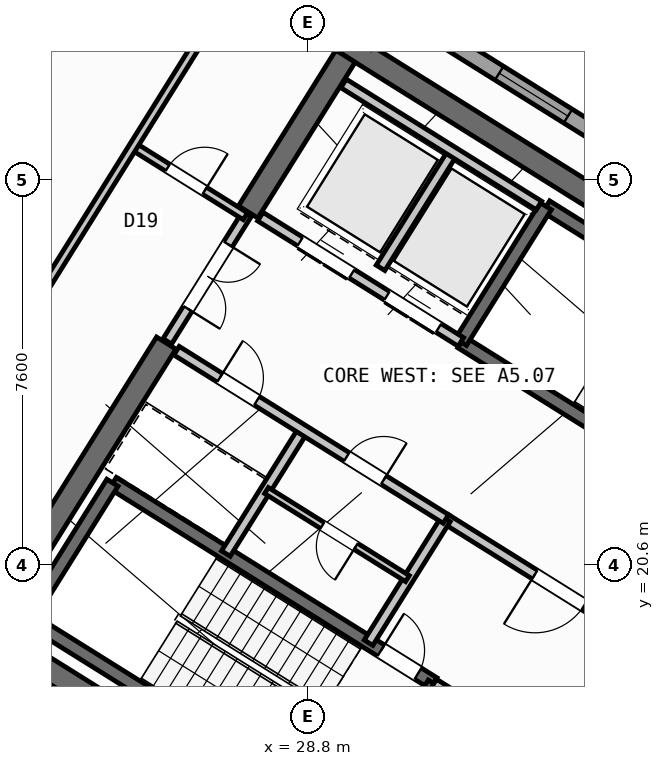
"""IFC4 building model, lengths in metres.
Left out: names, types, materials, properties, quantities, classifications, styles, units other than length and angle.
Written with IfcOpenShell. Run it as: python <this file> out.ifc"""

import sys

from ifc_helpers import new_model, si_unit, direction, frame, frame_2d, origin, place, context, subcontext, project, spatial, rectangle, extrude, source, transform, mapped, element, fill, save


model = new_model("IFC4")
c1 = context("Model", 3, precision=1e-05, world=origin(), true_north=direction((0.0, 1.0)))
c2 = subcontext(c1, "Body", "Model", "MODEL_VIEW")
j1 = project(units=[si_unit("LENGTHUNIT", "METRE"), si_unit("PLANEANGLEUNIT", "RADIAN")], contexts=[c1])
p1 = place(None, origin())
s1 = spatial("IfcSite", under=j1, at=p1, CompositionType="ELEMENT")
p2 = place(p1, origin())
s2 = spatial("IfcBuilding", under=s1, at=p2, CompositionType="ELEMENT")
p3 = place(p2, frame((0.0, 0.0, 254.7)))
s3 = spatial("IfcBuildingStorey", under=s2, at=p3, CompositionType="ELEMENT", Elevation=254.7)
p4 = place(p3, frame((40.531, 24.036, 0.0), z_axis=(0.0, 0.0, 1.0), x_axis=(-0.848048787466, 0.529918157905, 0.0)))
e1 = element("IfcWall", 1, at=p4, inside=s3, PredefinedType="SHEAR", context=c2, shape_type="SweptSolid", body=[
    extrude(rectangle(XDim=13.04, YDim=0.45, at=frame_2d((6.52, 0.0))), origin(), (0.0, 0.0, 1.0), 4.25),
])
p5 = place(p3, frame((33.324, 12.503, 0.0), z_axis=(0.0, 0.0, 1.0), x_axis=(-0.848043529849, 0.529926571782, 0.0)))
e2 = element("IfcWall", 2, at=p5, inside=s3, PredefinedType="SHEAR", context=c2, shape_type="SweptSolid", body=[
    extrude(rectangle(XDim=13.04, YDim=0.45, at=frame_2d((6.52, 0.0))), origin(), (0.0, 0.0, 1.0), 4.25),
])
p6 = place(p3, frame((36.683, 18.304, 0.0), z_axis=(0.0, 0.0, 1.0), x_axis=(-0.529904039071, -0.848057609704, 0.0)))
e3 = element("IfcWall", 3, at=p6, inside=s3, PredefinedType="SHEAR", context=c2, shape_type="SweptSolid", body=[
    extrude(rectangle(XDim=6.475, YDim=0.45, at=frame_2d((3.238, 0.0))), origin(), (0.0, 0.0, 1.0), 4.25),
])
p7 = place(p3, frame((29.544, 30.636, 0.0), z_axis=(0.0, 0.0, 1.0), x_axis=(-0.529902075036, -0.848058836916, 0.0)))
e4 = element("IfcWall", 4, at=p7, inside=s3, PredefinedType="SHEAR", context=c2, shape_type="SweptSolid", body=[
    extrude(rectangle(XDim=3.625, YDim=0.45, at=frame_2d((1.812, 0.0))), origin(), (0.0, 0.0, 1.0), 4.25),
])
p8 = place(p3, frame((26.007, 24.976, 0.0), z_axis=(0.0, 0.0, 1.0), x_axis=(-0.529931155655, -0.848040665456, 0.0)))
e5 = element("IfcWall", 5, at=p8, inside=s3, PredefinedType="SHEAR", context=c2, shape_type="SweptSolid", body=[
    extrude(rectangle(XDim=6.475, YDim=0.45, at=frame_2d((3.238, 0.0))), origin(), (0.0, 0.0, 1.0), 4.25),
])
p9 = place(p3, frame((29.268, 6.429, 0.0), z_axis=(0.0, 0.0, 1.0), x_axis=(-0.848049971435, 0.529916263149, 0.0)))
e6 = element("IfcWall", 6, at=p9, inside=s3, PredefinedType="STANDARD", context=c2, shape_type="SweptSolid", body=[
    extrude(rectangle(XDim=31.588, YDim=0.32, at=frame_2d((15.794, 0.0))), origin(), (0.0, 0.0, 1.0), 4.25),
])
p10 = place(p9, frame((22.349, 0.0, 0.0)))
e7 = element("IfcOpeningElement", 7, at=p10, cuts=e6, PredefinedType="OPENING", context=c2, shape_type="SweptSolid", body=[
    extrude(rectangle(XDim=1.2, YDim=2.15, at=frame_2d((0.6, 1.075))), frame((0.0, 0.17, 0.0), z_axis=(0.0, -1.0, 0.0), x_axis=(1.0, 0.0, 0.0)), (0.0, 0.0, 1.0), 0.34),
])
p11 = place(p9, frame((11.489, 0.0, 0.7)))
e8 = element("IfcOpeningElement", 8, at=p11, cuts=e6, PredefinedType="OPENING", context=c2, shape_type="SweptSolid", body=[
    extrude(rectangle(XDim=2.6, YDim=2.0, at=frame_2d((1.3, 1.0))), frame((0.0, 0.17, 0.0), z_axis=(0.0, -1.0, 0.0), x_axis=(1.0, 0.0, 0.0)), (0.0, 0.0, 1.0), 0.34),
])
p12 = place(p9, frame((17.881, 0.0, 0.75)))
e9 = element("IfcOpeningElement", 9, at=p12, cuts=e6, PredefinedType="OPENING", context=c2, shape_type="SweptSolid", body=[
    extrude(rectangle(XDim=2.0, YDim=1.95, at=frame_2d((1.0, 0.975))), frame((0.0, 0.17, 0.0), z_axis=(0.0, -1.0, 0.0), x_axis=(1.0, 0.0, 0.0)), (0.0, 0.0, 1.0), 0.34),
])
p13 = place(p9, frame((25.501, 0.0, 0.85)))
e10 = element("IfcOpeningElement", 10, at=p13, cuts=e6, PredefinedType="OPENING", context=c2, shape_type="SweptSolid", body=[
    extrude(rectangle(XDim=1.6, YDim=1.8, at=frame_2d((0.8, 0.9))), frame((0.0, 0.17, 0.0), z_axis=(0.0, -1.0, 0.0), x_axis=(1.0, 0.0, 0.0)), (0.0, 0.0, 1.0), 0.34),
])
p14 = place(p9, frame((28.725, 0.0, 0.85)))
e11 = element("IfcOpeningElement", 11, at=p14, cuts=e6, PredefinedType="OPENING", context=c2, shape_type="SweptSolid", body=[
    extrude(rectangle(XDim=1.6, YDim=1.8, at=frame_2d((0.8, 0.9))), frame((0.0, 0.17, 0.0), z_axis=(0.0, -1.0, 0.0), x_axis=(1.0, 0.0, 0.0)), (0.0, 0.0, 1.0), 0.34),
])
p15 = place(p3, frame((14.138, 41.825, 0.0), z_axis=(0.0, 0.0, 1.0), x_axis=(0.848046498049, -0.529921821731, 0.0)))
e12 = element("IfcWall", 12, at=p15, inside=s3, PredefinedType="STANDARD", context=c2, shape_type="SweptSolid", body=[
    extrude(rectangle(XDim=31.588, YDim=0.32, at=frame_2d((15.794, 0.0))), origin(), (0.0, 0.0, 1.0), 4.25),
])
p16 = place(p15, frame((9.946, 0.0, 0.0)))
e13 = element("IfcOpeningElement", 13, at=p16, cuts=e12, PredefinedType="OPENING", context=c2, shape_type="SweptSolid", body=[
    extrude(rectangle(XDim=1.05, YDim=2.15, at=frame_2d((0.525, 1.075))), frame((0.0, 0.17, 0.0), z_axis=(0.0, -1.0, 0.0), x_axis=(1.0, 0.0, 0.0)), (0.0, 0.0, 1.0), 0.34),
])
p17 = place(p15, frame((0.763, 0.0, 0.75)))
e14 = element("IfcOpeningElement", 14, at=p17, cuts=e12, PredefinedType="OPENING", context=c2, shape_type="SweptSolid", body=[
    extrude(rectangle(XDim=2.0, YDim=1.95, at=frame_2d((1.0, 0.975))), frame((0.0, 0.17, 0.0), z_axis=(0.0, -1.0, 0.0), x_axis=(1.0, 0.0, 0.0)), (0.0, 0.0, 1.0), 0.34),
])
p18 = place(p15, frame((13.574, 0.0, 0.75)))
e15 = element("IfcOpeningElement", 15, at=p18, cuts=e12, PredefinedType="OPENING", context=c2, shape_type="SweptSolid", body=[
    extrude(rectangle(XDim=2.0, YDim=1.95, at=frame_2d((1.0, 0.975))), frame((0.0, 0.17, 0.0), z_axis=(0.0, -1.0, 0.0), x_axis=(1.0, 0.0, 0.0)), (0.0, 0.0, 1.0), 0.34),
])
p19 = place(p15, frame((21.744, 0.0, 0.85)))
e16 = element("IfcOpeningElement", 16, at=p19, cuts=e12, PredefinedType="OPENING", context=c2, shape_type="SweptSolid", body=[
    extrude(rectangle(XDim=1.6, YDim=1.8, at=frame_2d((0.8, 0.9))), frame((0.0, 0.17, 0.0), z_axis=(0.0, -1.0, 0.0), x_axis=(1.0, 0.0, 0.0)), (0.0, 0.0, 1.0), 0.34),
])
p20 = place(p15, frame((27.444, 0.0, 0.85)))
e17 = element("IfcOpeningElement", 17, at=p20, cuts=e12, PredefinedType="OPENING", context=c2, shape_type="SweptSolid", body=[
    extrude(rectangle(XDim=1.6, YDim=1.8, at=frame_2d((0.8, 0.9))), frame((0.0, 0.17, 0.0), z_axis=(0.0, -1.0, 0.0), x_axis=(1.0, 0.0, 0.0)), (0.0, 0.0, 1.0), 0.34),
])
p21 = place(p3, frame((29.605, 15.581, 0.0), z_axis=(0.0, 0.0, 1.0), x_axis=(-0.848036911448, 0.529937163087, 0.0)))
e18 = element("IfcWall", 18, at=p21, inside=s3, PredefinedType="SHEAR", context=c2, shape_type="SweptSolid", body=[
    extrude(rectangle(XDim=7.46, YDim=0.26, at=frame_2d((3.73, 0.0))), origin(), (0.0, 0.0, 1.0), 4.25),
])
p22 = place(p3, frame((31.28, 18.261, 0.0), z_axis=(0.0, 0.0, 1.0), x_axis=(-0.848051618787, 0.529913626805, 0.0)))
e19 = element("IfcWall", 19, at=p22, inside=s3, PredefinedType="SHEAR", context=c2, shape_type="SweptSolid", body=[
    extrude(rectangle(XDim=7.46, YDim=0.26, at=frame_2d((3.73, 0.0))), origin(), (0.0, 0.0, 1.0), 4.25),
])
p23 = place(p22, frame((0.36, 0.0, 0.0)))
e20 = element("IfcOpeningElement", 20, at=p23, cuts=e19, PredefinedType="OPENING", context=c2, shape_type="SweptSolid", body=[
    extrude(rectangle(XDim=0.86, YDim=2.05, at=frame_2d((0.43, 1.025))), frame((0.0, 0.14, 0.0), z_axis=(0.0, -1.0, 0.0), x_axis=(1.0, 0.0, 0.0)), (0.0, 0.0, 1.0), 0.28),
])
p24 = place(p3, frame((31.288, 18.256, 0.0), z_axis=(0.0, 0.0, 1.0), x_axis=(-0.529943379326, -0.848033026897, 0.0)))
e21 = element("IfcWall", 21, at=p24, inside=s3, PredefinedType="SHEAR", context=c2, shape_type="SweptSolid", body=[
    extrude(rectangle(XDim=3.16, YDim=0.26, at=frame_2d((1.58, 0.0))), origin(), (0.0, 0.0, 1.0), 4.25),
])
p25 = place(p3, frame((24.945, 22.22, 0.0), z_axis=(0.0, 0.0, 1.0), x_axis=(-0.529908658664, -0.84805472316, 0.0)))
e22 = element("IfcWall", 22, at=p25, inside=s3, PredefinedType="SHEAR", context=c2, shape_type="SweptSolid", body=[
    extrude(rectangle(XDim=3.16, YDim=0.26, at=frame_2d((1.58, 0.0))), origin(), (0.0, 0.0, 1.0), 4.25),
])
p26 = place(p3, frame((39.721, 23.788, 0.0), z_axis=(0.0, 0.0, 1.0), x_axis=(-0.848054434086, 0.529909121291, 0.0)))
e23 = element("IfcWall", 23, at=p26, inside=s3, PredefinedType="SHEAR", context=c2, shape_type="SweptSolid", body=[
    extrude(rectangle(XDim=7.33, YDim=0.26, at=frame_2d((3.665, 0.0))), origin(), (0.0, 0.0, 1.0), 4.25),
])
p27 = place(p3, frame((38.046, 21.108, 0.0), z_axis=(0.0, 0.0, 1.0), x_axis=(-0.848054434086, 0.529909121291, 0.0)))
e24 = element("IfcWall", 24, at=p27, inside=s3, PredefinedType="SHEAR", context=c2, shape_type="SweptSolid", body=[
    extrude(rectangle(XDim=7.33, YDim=0.26, at=frame_2d((3.665, 0.0))), origin(), (0.0, 0.0, 1.0), 4.25),
])
p28 = place(p27, frame((0.22, 0.0, 0.0)))
e25 = element("IfcOpeningElement", 25, at=p28, cuts=e24, PredefinedType="OPENING", context=c2, shape_type="SweptSolid", body=[
    extrude(rectangle(XDim=1.1, YDim=2.1, at=frame_2d((0.55, 1.05))), frame((0.0, 0.14, 0.0), z_axis=(0.0, -1.0, 0.0), x_axis=(1.0, 0.0, 0.0)), (0.0, 0.0, 1.0), 0.28),
])
p29 = place(p3, frame((33.496, 27.677, 0.0), z_axis=(0.0, 0.0, 1.0), x_axis=(-0.529908658664, -0.84805472316, 0.0)))
e26 = element("IfcWall", 26, at=p29, inside=s3, PredefinedType="SHEAR", context=c2, shape_type="SweptSolid", body=[
    extrude(rectangle(XDim=3.16, YDim=0.26, at=frame_2d((1.58, 0.0))), origin(), (0.0, 0.0, 1.0), 4.25),
])
p30 = place(p3, frame((34.933, 15.978, 0.0), z_axis=(0.0, 0.0, 1.0), x_axis=(-0.848055739377, 0.529907032327, 0.0)))
e27 = element("IfcWall", 27, at=p30, inside=s3, PredefinedType="STANDARD", context=c2, shape_type="SweptSolid", body=[
    extrude(rectangle(XDim=4.298, YDim=0.2, at=frame_2d((2.149, 0.0))), origin(), (0.0, 0.0, 1.0), 4.24),
])
p31 = place(p30, frame((0.448, 0.0, 0.0)))
e28 = element("IfcOpeningElement", 28, at=p31, cuts=e27, PredefinedType="OPENING", context=c2, shape_type="SweptSolid", body=[
    extrude(rectangle(XDim=1.3, YDim=2.2, at=frame_2d((0.65, 1.1))), frame((0.0, 0.11, 0.0), z_axis=(0.0, -1.0, 0.0), x_axis=(1.0, 0.0, 0.0)), (0.0, 0.0, 1.0), 0.22),
])
p32 = place(p30, frame((2.523, 0.0, 0.0)))
e29 = element("IfcOpeningElement", 29, at=p32, cuts=e27, PredefinedType="OPENING", context=c2, shape_type="SweptSolid", body=[
    extrude(rectangle(XDim=1.45, YDim=2.25, at=frame_2d((0.725, 1.125))), frame((0.0, 0.11, 0.0), z_axis=(0.0, -1.0, 0.0), x_axis=(1.0, 0.0, 0.0)), (0.0, 0.0, 1.0), 0.22),
])
p33 = place(p3, frame((36.459, 18.421, 0.0), z_axis=(0.0, 0.0, 1.0), x_axis=(-0.848059591691, 0.529900867089, 0.0)))
e30 = element("IfcWall", 30, at=p33, inside=s3, PredefinedType="STANDARD", context=c2, shape_type="SweptSolid", body=[
    extrude(rectangle(XDim=5.818, YDim=0.2, at=frame_2d((2.909, 0.0))), origin(), (0.0, 0.0, 1.0), 4.24),
])
p34 = place(p33, frame((2.598, 0.0, 0.0)))
e31 = element("IfcOpeningElement", 31, at=p34, cuts=e30, PredefinedType="OPENING", context=c2, shape_type="SweptSolid", body=[
    extrude(rectangle(XDim=1.15, YDim=2.1, at=frame_2d((0.575, 1.05))), frame((0.0, 0.11, 0.0), z_axis=(0.0, -1.0, 0.0), x_axis=(1.0, 0.0, 0.0)), (0.0, 0.0, 1.0), 0.22),
])
p35 = place(p3, frame((31.822, 24.998, 0.0), z_axis=(0.0, 0.0, 1.0), x_axis=(-0.848054125777, 0.529909614701, 0.0)))
e32 = element("IfcWall", 32, at=p35, inside=s3, PredefinedType="STANDARD", context=c2, shape_type="SweptSolid", body=[
    extrude(rectangle(XDim=4.668, YDim=0.2, at=frame_2d((2.334, 0.0))), origin(), (0.0, 0.0, 1.0), 4.24),
])
p36 = place(p35, frame((0.52, 0.0, 0.0)))
e33 = element("IfcOpeningElement", 33, at=p36, cuts=e32, PredefinedType="OPENING", context=c2, shape_type="SweptSolid", body=[
    extrude(rectangle(XDim=1.2, YDim=2.15, at=frame_2d((0.6, 1.075))), frame((0.0, 0.11, 0.0), z_axis=(0.0, -1.0, 0.0), x_axis=(1.0, 0.0, 0.0)), (0.0, 0.0, 1.0), 0.22),
])
p37 = place(p35, frame((2.54, 0.0, 0.0)))
e34 = element("IfcOpeningElement", 34, at=p37, cuts=e32, PredefinedType="OPENING", context=c2, shape_type="SweptSolid", body=[
    extrude(rectangle(XDim=1.2, YDim=2.15, at=frame_2d((0.6, 1.075))), frame((0.0, 0.11, 0.0), z_axis=(0.0, -1.0, 0.0), x_axis=(1.0, 0.0, 0.0)), (0.0, 0.0, 1.0), 0.22),
])
p38 = place(p3, frame((31.645, 28.716, 0.0), z_axis=(0.0, 0.0, 1.0), x_axis=(-0.52986693015, -0.848080795876, 0.0)))
e35 = element("IfcWall", 35, at=p38, inside=s3, PredefinedType="STANDARD", context=c2, shape_type="SweptSolid", body=[
    extrude(rectangle(XDim=2.66, YDim=0.2, at=frame_2d((1.33, 0.0))), origin(), (0.0, 0.0, 1.0), 4.24),
])
p39 = place(p3, frame((33.363, 27.69, 0.0), z_axis=(0.0, 0.0, 1.0), x_axis=(-0.84804957148, 0.529916903215, 0.0)))
e36 = element("IfcWall", 36, at=p39, inside=s3, PredefinedType="STANDARD", context=c2, shape_type="SweptSolid", body=[
    extrude(rectangle(XDim=4.548, YDim=0.2, at=frame_2d((2.274, 0.0))), origin(), (0.0, 0.0, 1.0), 4.24),
])
for number, where, z_axis, x_axis in (
    (37, (31.525, 21.504, 0.0), (0.0, 0.0, 1.0), (-0.53, -0.848, 0.0)),
    (38, (28.71, 23.263, 0.0), (0.0, 0.0, 1.0), (-0.53, -0.848, 0.0)),
):
    element("IfcWall", number, at=place(p3, frame(where, z_axis=z_axis, x_axis=x_axis)), inside=s3, PredefinedType="STANDARD", context=c2, shape_type="SweptSolid", body=[
        extrude(rectangle(XDim=2.88, YDim=0.2, at=frame_2d((1.44, 0.0))), origin(), (0.0, 0.0, 1.0), 4.24),
    ])
p40 = place(p3, frame((31.525, 21.504, 0.0), z_axis=(0.0, 0.0, 1.0), x_axis=(-0.848042066329, 0.529928913853, 0.0)))
e39 = element("IfcWall", 39, at=p40, inside=s3, PredefinedType="STANDARD", context=c2, shape_type="SweptSolid", body=[
    extrude(rectangle(XDim=6.268, YDim=0.2, at=frame_2d((3.134, 0.0))), origin(), (0.0, 0.0, 1.0), 4.24),
])
p41 = place(p40, frame((4.4, 0.0, 0.0)))
e40 = element("IfcOpeningElement", 40, at=p41, cuts=e39, PredefinedType="OPENING", context=c2, shape_type="SweptSolid", body=[
    extrude(rectangle(XDim=0.86, YDim=2.05, at=frame_2d((0.43, 1.025))), frame((0.0, 0.11, 0.0), z_axis=(0.0, -1.0, 0.0), x_axis=(1.0, 0.0, 0.0)), (0.0, 0.0, 1.0), 0.22),
])
p42 = place(p40, frame((1.45, 0.0, 0.0)))
e41 = element("IfcOpeningElement", 41, at=p42, cuts=e39, PredefinedType="OPENING", context=c2, shape_type="SweptSolid", body=[
    extrude(rectangle(XDim=0.86, YDim=2.05, at=frame_2d((0.43, 1.025))), frame((0.0, 0.11, 0.0), z_axis=(0.0, -1.0, 0.0), x_axis=(1.0, 0.0, 0.0)), (0.0, 0.0, 1.0), 0.22),
])
p43 = place(p3, frame((30.766, 20.327, 0.0), z_axis=(0.0, 0.0, 1.0), x_axis=(-0.848052663127, 0.529911955482, 0.0)))
e42 = element("IfcWall", 42, at=p43, inside=s3, PredefinedType="PLUMBINGWALL", context=c2, shape_type="SweptSolid", body=[
    extrude(rectangle(XDim=3.28, YDim=0.14, at=frame_2d((1.64, 0.0))), origin(), (0.0, 0.0, 1.0), 4.24),
])
p44 = place(p43, frame((1.2, 0.0, 0.0)))
e43 = element("IfcOpeningElement", 43, at=p44, cuts=e42, PredefinedType="OPENING", context=c2, shape_type="SweptSolid", body=[
    extrude(rectangle(XDim=0.78, YDim=2.05, at=frame_2d((0.39, 1.025))), frame((0.0, 0.08, 0.0), z_axis=(0.0, -1.0, 0.0), x_axis=(1.0, 0.0, 0.0)), (0.0, 0.0, 1.0), 0.16),
])
p45 = place(p3, frame((27.596, 27.52, 0.0), z_axis=(0.0, 0.0, 1.0), x_axis=(-0.529865479138, -0.848081702443, 0.0)))
e44 = element("IfcWall", 44, at=p45, inside=s3, PredefinedType="STANDARD", context=c2, shape_type="SweptSolid", body=[
    extrude(rectangle(XDim=2.96, YDim=0.2, at=frame_2d((1.48, 0.0))), origin(), (0.0, 0.0, 1.0), 4.24),
])
p46 = place(p45, frame((0.7, 0.0, 0.0)))
e45 = element("IfcOpeningElement", 45, at=p46, cuts=e44, PredefinedType="OPENING", context=c2, shape_type="SweptSolid", body=[
    extrude(rectangle(XDim=1.5, YDim=2.15, at=frame_2d((0.75, 1.075))), frame((0.0, 0.11, 0.0), z_axis=(0.0, -1.0, 0.0), x_axis=(1.0, 0.0, 0.0)), (0.0, 0.0, 1.0), 0.22),
])
p47 = place(p3, frame((27.57, 27.478, 0.0), z_axis=(0.0, 0.0, 1.0), x_axis=(-0.848050851465, 0.529914854792, 0.0)))
e46 = element("IfcWall", 46, at=p47, inside=s3, PredefinedType="PARTITIONING", context=c2, shape_type="SweptSolid", body=[
    extrude(rectangle(XDim=2.61, YDim=0.16, at=frame_2d((1.305, 0.0))), origin(), (0.0, 0.0, 1.0), 4.24),
])
p48 = place(p47, frame((0.95, 0.0, 0.0)))
e47 = element("IfcOpeningElement", 47, at=p48, cuts=e46, PredefinedType="OPENING", context=c2, shape_type="SweptSolid", body=[
    extrude(rectangle(XDim=0.86, YDim=2.05, at=frame_2d((0.43, 1.025))), frame((0.0, 0.09, 0.0), z_axis=(0.0, -1.0, 0.0), x_axis=(1.0, 0.0, 0.0)), (0.0, 0.0, 1.0), 0.18),
])
p49 = place(p3, frame((27.953, 33.016, 0.0), z_axis=(0.0, 0.0, 1.0), x_axis=(-0.529905022231, -0.848056995381, 0.0)))
e48 = element("IfcWall", 48, at=p49, inside=s3, PredefinedType="PARTITIONING", context=c2, shape_type="SweptSolid", body=[
    extrude(rectangle(XDim=11.45, YDim=0.16, at=frame_2d((5.725, 0.0))), origin(), (0.0, 0.0, 1.0), 4.24),
])
p50 = place(p3, frame((32.164, 10.374, 0.0), z_axis=(0.0, 0.0, 1.0), x_axis=(-0.848044107957, 0.529925646633, 0.0)))
e49 = element("IfcWall", 49, at=p50, inside=s3, PredefinedType="PARTITIONING", context=c2, shape_type="SweptSolid", body=[
    extrude(rectangle(XDim=15.57, YDim=0.16, at=frame_2d((7.785, 0.0))), origin(), (0.0, 0.0, 1.0), 4.24),
])
p51 = place(p50, frame((0.85, 0.0, 0.0)))
e50 = element("IfcOpeningElement", 50, at=p51, cuts=e49, PredefinedType="OPENING", context=c2, shape_type="SweptSolid", body=[
    extrude(rectangle(XDim=0.86, YDim=2.05, at=frame_2d((0.43, 1.025))), frame((0.0, 0.09, 0.0), z_axis=(0.0, -1.0, 0.0), x_axis=(1.0, 0.0, 0.0)), (0.0, 0.0, 1.0), 0.18),
])
p52 = place(p50, frame((3.87, 0.0, 0.0)))
e51 = element("IfcOpeningElement", 51, at=p52, cuts=e49, PredefinedType="OPENING", context=c2, shape_type="SweptSolid", body=[
    extrude(rectangle(XDim=0.86, YDim=2.05, at=frame_2d((0.43, 1.025))), frame((0.0, 0.09, 0.0), z_axis=(0.0, -1.0, 0.0), x_axis=(1.0, 0.0, 0.0)), (0.0, 0.0, 1.0), 0.18),
])
p53 = place(p50, frame((6.33, 0.0, 0.0)))
e52 = element("IfcOpeningElement", 52, at=p53, cuts=e49, PredefinedType="OPENING", context=c2, shape_type="SweptSolid", body=[
    extrude(rectangle(XDim=0.78, YDim=2.05, at=frame_2d((0.39, 1.025))), frame((0.0, 0.09, 0.0), z_axis=(0.0, -1.0, 0.0), x_axis=(1.0, 0.0, 0.0)), (0.0, 0.0, 1.0), 0.18),
])
p54 = place(p50, frame((8.78, 0.0, 0.0)))
e53 = element("IfcOpeningElement", 53, at=p54, cuts=e49, PredefinedType="OPENING", context=c2, shape_type="SweptSolid", body=[
    extrude(rectangle(XDim=0.78, YDim=2.05, at=frame_2d((0.39, 1.025))), frame((0.0, 0.09, 0.0), z_axis=(0.0, -1.0, 0.0), x_axis=(1.0, 0.0, 0.0)), (0.0, 0.0, 1.0), 0.18),
])
p55 = place(p50, frame((11.18, 0.0, 0.0)))
e54 = element("IfcOpeningElement", 54, at=p55, cuts=e49, PredefinedType="OPENING", context=c2, shape_type="SweptSolid", body=[
    extrude(rectangle(XDim=0.78, YDim=2.05, at=frame_2d((0.39, 1.025))), frame((0.0, 0.09, 0.0), z_axis=(0.0, -1.0, 0.0), x_axis=(1.0, 0.0, 0.0)), (0.0, 0.0, 1.0), 0.18),
])
m1 = source(origin(), c2, "Body", "SweptSolid", [
    extrude(rectangle(XDim=1.6, YDim=1.8, at=frame_2d((0.8, 0.9))), frame((0.0, 0.03, 0.0), z_axis=(0.0, -1.0, 0.0), x_axis=(1.0, 0.0, 0.0)), (0.0, 0.0, 1.0), 0.06),
])
p56 = place(p19, origin())
e55 = element("IfcWindow", 55, at=p56, inside=s3, PartitioningType="SINGLE_PANEL", PredefinedType="WINDOW", context=c2, shape_type="MappedRepresentation", body=[
    mapped(m1, transform((0.0, 0.0, 0.0), scale=1.0)),
])
fill(e16, e55)
m2 = source(origin(), c2, "Body", "SweptSolid", [
    extrude(rectangle(XDim=0.86, YDim=2.05, at=frame_2d((0.43, 1.025))), frame((0.0, 0.025, 0.0), z_axis=(0.0, -1.0, 0.0), x_axis=(1.0, 0.0, 0.0)), (0.0, 0.0, 1.0), 0.05),
])
p57 = place(p23, frame((0.86, 0.0, 0.0), z_axis=(0.0, 0.0, 1.0), x_axis=(-1.0, 0.0, 0.0)))
e56 = element("IfcDoor", 56, at=p57, inside=s3, OperationType="SINGLE_SWING_LEFT", PredefinedType="DOOR", context=c2, shape_type="MappedRepresentation", body=[
    mapped(m2, transform((0.0, 0.0, 0.0), scale=1.0)),
])
fill(e20, e56)
m3 = source(origin(), c2, "Body", "SweptSolid", [
    extrude(rectangle(XDim=1.15, YDim=2.1, at=frame_2d((0.575, 1.05))), frame((0.0, 0.025, 0.0), z_axis=(0.0, -1.0, 0.0), x_axis=(1.0, 0.0, 0.0)), (0.0, 0.0, 1.0), 0.05),
])
p58 = place(p34, origin())
e57 = element("IfcDoor", 57, at=p58, inside=s3, OperationType="SINGLE_SWING_RIGHT", PredefinedType="DOOR", context=c2, shape_type="MappedRepresentation", body=[
    mapped(m3, transform((0.0, 0.0, 0.0), scale=1.0)),
])
fill(e31, e57)
m4 = source(origin(), c2, "Body", "SweptSolid", [
    extrude(rectangle(XDim=1.2, YDim=2.15, at=frame_2d((0.6, 1.075))), frame((0.0, 0.025, 0.0), z_axis=(0.0, -1.0, 0.0), x_axis=(1.0, 0.0, 0.0)), (0.0, 0.0, 1.0), 0.05),
])
p59 = place(p36, origin())
e58 = element("IfcDoor", 58, at=p59, inside=s3, OperationType="DOUBLE_DOOR_SLIDING", PredefinedType="DOOR", context=c2, shape_type="MappedRepresentation", body=[
    mapped(m4, transform((0.0, 0.0, 0.0), scale=1.0)),
])
fill(e33, e58)
p60 = place(p37, origin())
e59 = element("IfcDoor", 59, at=p60, inside=s3, OperationType="DOUBLE_DOOR_SLIDING", PredefinedType="DOOR", context=c2, shape_type="MappedRepresentation", body=[
    mapped(m4, transform((0.0, 0.0, 0.0), scale=1.0)),
])
fill(e34, e59)
p61 = place(p41, frame((0.86, 0.0, 0.0), z_axis=(0.0, 0.0, 1.0), x_axis=(-1.0, 0.0, 0.0)))
e60 = element("IfcDoor", 60, at=p61, inside=s3, OperationType="SINGLE_SWING_LEFT", PredefinedType="DOOR", context=c2, shape_type="MappedRepresentation", body=[
    mapped(m2, transform((0.0, 0.0, 0.0), scale=1.0)),
])
fill(e40, e60)
p62 = place(p42, frame((0.86, 0.0, 0.0), z_axis=(0.0, 0.0, 1.0), x_axis=(-1.0, 0.0, 0.0)))
e61 = element("IfcDoor", 61, at=p62, inside=s3, OperationType="SINGLE_SWING_RIGHT", PredefinedType="DOOR", context=c2, shape_type="MappedRepresentation", body=[
    mapped(m2, transform((0.0, 0.0, 0.0), scale=1.0)),
])
fill(e41, e61)
m5 = source(origin(), c2, "Body", "SweptSolid", [
    extrude(rectangle(XDim=0.78, YDim=2.05, at=frame_2d((0.39, 1.025))), frame((0.0, 0.025, 0.0), z_axis=(0.0, -1.0, 0.0), x_axis=(1.0, 0.0, 0.0)), (0.0, 0.0, 1.0), 0.05),
])
p63 = place(p44, origin())
e62 = element("IfcDoor", 62, at=p63, inside=s3, OperationType="SINGLE_SWING_LEFT", PredefinedType="DOOR", context=c2, shape_type="MappedRepresentation", body=[
    mapped(m5, transform((0.0, 0.0, 0.0), scale=1.0)),
])
fill(e43, e62)
p64 = place(p48, frame((0.86, 0.0, 0.0), z_axis=(0.0, 0.0, 1.0), x_axis=(-1.0, 0.0, 0.0)))
e63 = element("IfcDoor", 63, at=p64, inside=s3, OperationType="SINGLE_SWING_RIGHT", PredefinedType="DOOR", context=c2, shape_type="MappedRepresentation", body=[
    mapped(m2, transform((0.0, 0.0, 0.0), scale=1.0)),
])
fill(e47, e63)
m6 = source(origin(), c2, "Body", "SweptSolid", [
    extrude(rectangle(XDim=1.5, YDim=2.15, at=frame_2d((0.75, 1.075))), frame((0.0, 0.025, 0.0), z_axis=(0.0, -1.0, 0.0), x_axis=(1.0, 0.0, 0.0)), (0.0, 0.0, 1.0), 0.05),
])
p65 = place(p46, origin())
e64 = element("IfcDoor", 64, at=p65, inside=s3, OperationType="DOUBLE_DOOR_SINGLE_SWING", PredefinedType="DOOR", context=c2, shape_type="MappedRepresentation", body=[
    mapped(m6, transform((0.0, 0.0, 0.0), scale=1.0)),
])
fill(e45, e64)
save(model, sys.argv[1])
